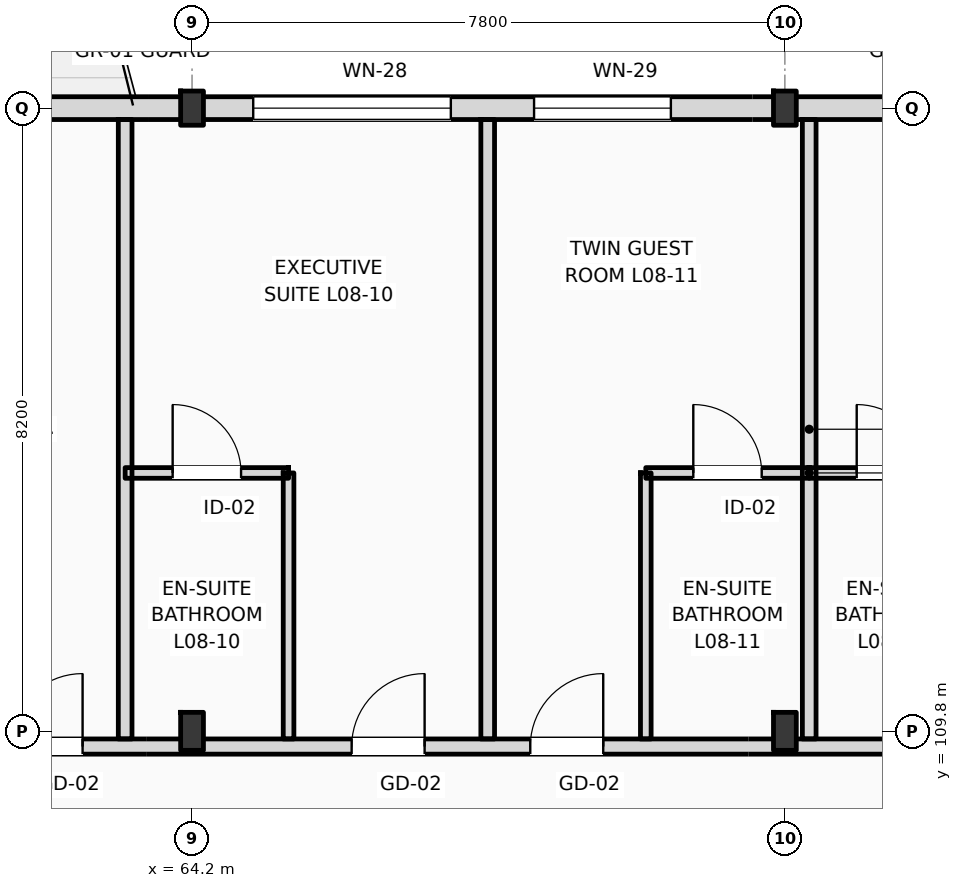
"""IFC4 building model, lengths in metres.
Left out: names, types, materials, properties, quantities, classifications, styles, units other than length and angle.
Written with IfcOpenShell. Run it as: python <this file> out.ifc"""

import sys

from ifc_helpers import new_model, si_unit, direction, frame, frame_2d, origin, origin_2d, place, context, subcontext, project, spatial, rectangle, i_section, extrude, element, fill, save


model = new_model("IFC4")
c1 = context("Model", 3, precision=1e-05, world=origin(), true_north=direction((0.0, 1.0)))
c2 = subcontext(c1, "Body", "Model", "MODEL_VIEW")
j1 = project(units=[si_unit("LENGTHUNIT", "METRE"), si_unit("PLANEANGLEUNIT", "RADIAN")], contexts=[c1])
p1 = place(None, origin())
s1 = spatial("IfcSite", under=j1, at=p1, CompositionType="ELEMENT")
p2 = place(p1, origin())
s2 = spatial("IfcBuilding", under=s1, at=p2, CompositionType="ELEMENT")
p3 = place(p2, frame((0.0, 0.0, 35.4)))
s3 = spatial("IfcBuildingStorey", under=s2, at=p3, CompositionType="ELEMENT", Elevation=35.4)
p4 = place(p3, frame((64.2, 109.8, 0.0), z_axis=(0.0, 0.0, 1.0), x_axis=(1.0, 0.0, 0.0)))
e1 = element("IfcColumn", 1, at=p4, inside=s3, PredefinedType="COLUMN", context=c2, shape_type="SweptSolid", body=[
    extrude(i_section(OverallWidth=0.3, OverallDepth=0.5, WebThickness=0.014, FlangeThickness=0.028, FilletRadius=0.027, at=origin_2d()), origin(), (0.0, 0.0, 1.0), 3.6),
])
p5 = place(p3, frame((64.2, 118.0, 0.0), z_axis=(0.0, 0.0, 1.0), x_axis=(1.0, 0.0, 0.0)))
e2 = element("IfcColumn", 2, at=p5, inside=s3, PredefinedType="COLUMN", context=c2, shape_type="SweptSolid", body=[
    extrude(i_section(OverallWidth=0.3, OverallDepth=0.45, WebThickness=0.014, FlangeThickness=0.026, FilletRadius=0.027, at=origin_2d()), origin(), (0.0, 0.0, 1.0), 3.6),
])
p6 = place(p3, frame((72.0, 109.8, 0.0), z_axis=(0.0, 0.0, 1.0), x_axis=(1.0, 0.0, 0.0)))
e3 = element("IfcColumn", 3, at=p6, inside=s3, PredefinedType="COLUMN", context=c2, shape_type="SweptSolid", body=[
    extrude(i_section(OverallWidth=0.3, OverallDepth=0.5, WebThickness=0.014, FlangeThickness=0.028, FilletRadius=0.027, at=origin_2d()), origin(), (0.0, 0.0, 1.0), 3.6),
])
p7 = place(p3, frame((72.0, 118.0, 0.0), z_axis=(0.0, 0.0, 1.0), x_axis=(1.0, 0.0, 0.0)))
e4 = element("IfcColumn", 4, at=p7, inside=s3, PredefinedType="COLUMN", context=c2, shape_type="SweptSolid", body=[
    extrude(i_section(OverallWidth=0.3, OverallDepth=0.45, WebThickness=0.014, FlangeThickness=0.026, FilletRadius=0.027, at=origin_2d()), origin(), (0.0, 0.0, 1.0), 3.6),
])
p8 = place(p3, frame((22.5, 118.0, 0.0), z_axis=(0.0, 0.0, 1.0), x_axis=(1.0, 0.0, 0.0)))
e5 = element("IfcWall", 5, at=p8, inside=s3, PredefinedType="STANDARD", context=c2, shape_type="SweptSolid", body=[
    extrude(rectangle(XDim=72.9, YDim=0.3, at=frame_2d((36.45, 0.0))), origin(), (0.0, 0.0, 1.0), 2.92),
])
p9 = place(p8, frame((0.91, 0.0, 0.9)))
e6 = element("IfcOpeningElement", 6, at=p9, cuts=e5, PredefinedType="OPENING", context=c2, shape_type="SweptSolid", body=[
    extrude(rectangle(XDim=0.9, YDim=1.84, at=frame_2d((0.45, 0.92))), frame((0.0, 0.16, 0.0), z_axis=(0.0, -1.0, 0.0), x_axis=(1.0, 0.0, 0.0)), (0.0, 0.0, 1.0), 0.32),
])
p10 = place(p8, frame((6.665, 0.0, 0.0)))
e7 = element("IfcOpeningElement", 7, at=p10, cuts=e5, PredefinedType="OPENING", context=c2, shape_type="SweptSolid", body=[
    extrude(rectangle(XDim=1.2, YDim=2.25, at=frame_2d((0.6, 1.125))), frame((0.0, 0.16, 0.0), z_axis=(0.0, -1.0, 0.0), x_axis=(1.0, 0.0, 0.0)), (0.0, 0.0, 1.0), 0.32),
])
p11 = place(p8, frame((11.355, 0.0, 0.9)))
e8 = element("IfcOpeningElement", 8, at=p11, cuts=e5, PredefinedType="OPENING", context=c2, shape_type="SweptSolid", body=[
    extrude(rectangle(XDim=1.1, YDim=1.5, at=frame_2d((0.55, 0.75))), frame((0.0, 0.16, 0.0), z_axis=(0.0, -1.0, 0.0), x_axis=(1.0, 0.0, 0.0)), (0.0, 0.0, 1.0), 0.32),
])
p12 = place(p8, frame((15.58, 0.0, 0.9)))
e9 = element("IfcOpeningElement", 9, at=p12, cuts=e5, PredefinedType="OPENING", context=c2, shape_type="SweptSolid", body=[
    extrude(rectangle(XDim=1.25, YDim=1.6, at=frame_2d((0.625, 0.8))), frame((0.0, 0.16, 0.0), z_axis=(0.0, -1.0, 0.0), x_axis=(1.0, 0.0, 0.0)), (0.0, 0.0, 1.0), 0.32),
])
p13 = place(p8, frame((21.08, 0.0, 0.0)))
e10 = element("IfcOpeningElement", 10, at=p13, cuts=e5, PredefinedType="OPENING", context=c2, shape_type="SweptSolid", body=[
    extrude(rectangle(XDim=1.2, YDim=2.25, at=frame_2d((0.6, 1.125))), frame((0.0, 0.16, 0.0), z_axis=(0.0, -1.0, 0.0), x_axis=(1.0, 0.0, 0.0)), (0.0, 0.0, 1.0), 0.32),
])
p14 = place(p8, frame((23.54, 0.0, 0.0)))
e11 = element("IfcOpeningElement", 11, at=p14, cuts=e5, PredefinedType="OPENING", context=c2, shape_type="SweptSolid", body=[
    extrude(rectangle(XDim=1.2, YDim=2.25, at=frame_2d((0.6, 1.125))), frame((0.0, 0.16, 0.0), z_axis=(0.0, -1.0, 0.0), x_axis=(1.0, 0.0, 0.0)), (0.0, 0.0, 1.0), 0.32),
])
p15 = place(p8, frame((28.83, 0.0, 0.9)))
e12 = element("IfcOpeningElement", 12, at=p15, cuts=e5, PredefinedType="OPENING", context=c2, shape_type="SweptSolid", body=[
    extrude(rectangle(XDim=1.75, YDim=1.84, at=frame_2d((0.875, 0.92))), frame((0.0, 0.16, 0.0), z_axis=(0.0, -1.0, 0.0), x_axis=(1.0, 0.0, 0.0)), (0.0, 0.0, 1.0), 0.32),
])
p16 = place(p8, frame((34.805, 0.0, 0.9)))
e13 = element("IfcOpeningElement", 13, at=p16, cuts=e5, PredefinedType="OPENING", context=c2, shape_type="SweptSolid", body=[
    extrude(rectangle(XDim=1.35, YDim=1.84, at=frame_2d((0.675, 0.92))), frame((0.0, 0.16, 0.0), z_axis=(0.0, -1.0, 0.0), x_axis=(1.0, 0.0, 0.0)), (0.0, 0.0, 1.0), 0.32),
])
p17 = place(p8, frame((38.105, 0.0, 0.0)))
e14 = element("IfcOpeningElement", 14, at=p17, cuts=e5, PredefinedType="OPENING", context=c2, shape_type="SweptSolid", body=[
    extrude(rectangle(XDim=1.2, YDim=2.25, at=frame_2d((0.6, 1.125))), frame((0.0, 0.16, 0.0), z_axis=(0.0, -1.0, 0.0), x_axis=(1.0, 0.0, 0.0)), (0.0, 0.0, 1.0), 0.32),
])
p18 = place(p8, frame((42.505, 0.0, 0.9)))
e15 = element("IfcOpeningElement", 15, at=p18, cuts=e5, PredefinedType="OPENING", context=c2, shape_type="SweptSolid", body=[
    extrude(rectangle(XDim=2.6, YDim=1.84, at=frame_2d((1.3, 0.92))), frame((0.0, 0.16, 0.0), z_axis=(0.0, -1.0, 0.0), x_axis=(1.0, 0.0, 0.0)), (0.0, 0.0, 1.0), 0.32),
])
p19 = place(p8, frame((46.2, 0.0, 0.9)))
e16 = element("IfcOpeningElement", 16, at=p19, cuts=e5, PredefinedType="OPENING", context=c2, shape_type="SweptSolid", body=[
    extrude(rectangle(XDim=1.8, YDim=1.84, at=frame_2d((0.9, 0.92))), frame((0.0, 0.16, 0.0), z_axis=(0.0, -1.0, 0.0), x_axis=(1.0, 0.0, 0.0)), (0.0, 0.0, 1.0), 0.32),
])
p20 = place(p8, frame((52.565, 0.0, 0.0)))
e17 = element("IfcOpeningElement", 17, at=p20, cuts=e5, PredefinedType="OPENING", context=c2, shape_type="SweptSolid", body=[
    extrude(rectangle(XDim=1.2, YDim=2.25, at=frame_2d((0.6, 1.125))), frame((0.0, 0.16, 0.0), z_axis=(0.0, -1.0, 0.0), x_axis=(1.0, 0.0, 0.0)), (0.0, 0.0, 1.0), 0.32),
])
p21 = place(p8, frame((55.305, 0.0, 0.9)))
e18 = element("IfcOpeningElement", 18, at=p21, cuts=e5, PredefinedType="OPENING", context=c2, shape_type="SweptSolid", body=[
    extrude(rectangle(XDim=1.2, YDim=1.8, at=frame_2d((0.6, 0.9))), frame((0.0, 0.16, 0.0), z_axis=(0.0, -1.0, 0.0), x_axis=(1.0, 0.0, 0.0)), (0.0, 0.0, 1.0), 0.32),
])
p22 = place(p8, frame((60.53, 0.0, 0.9)))
e19 = element("IfcOpeningElement", 19, at=p22, cuts=e5, PredefinedType="OPENING", context=c2, shape_type="SweptSolid", body=[
    extrude(rectangle(XDim=1.35, YDim=1.84, at=frame_2d((0.675, 0.92))), frame((0.0, 0.16, 0.0), z_axis=(0.0, -1.0, 0.0), x_axis=(1.0, 0.0, 0.0)), (0.0, 0.0, 1.0), 0.32),
])
p23 = place(p8, frame((65.955, 0.0, 0.9)))
e20 = element("IfcOpeningElement", 20, at=p23, cuts=e5, PredefinedType="OPENING", context=c2, shape_type="SweptSolid", body=[
    extrude(rectangle(XDim=1.35, YDim=1.84, at=frame_2d((0.675, 0.92))), frame((0.0, 0.16, 0.0), z_axis=(0.0, -1.0, 0.0), x_axis=(1.0, 0.0, 0.0)), (0.0, 0.0, 1.0), 0.32),
])
p24 = place(p8, frame((69.335, 0.0, 0.9)))
e21 = element("IfcOpeningElement", 21, at=p24, cuts=e5, PredefinedType="OPENING", context=c2, shape_type="SweptSolid", body=[
    extrude(rectangle(XDim=1.65, YDim=1.84, at=frame_2d((0.825, 0.92))), frame((0.0, 0.16, 0.0), z_axis=(0.0, -1.0, 0.0), x_axis=(1.0, 0.0, 0.0)), (0.0, 0.0, 1.0), 0.32),
])
p25 = place(p3, frame((10.65, 109.6, 0.0), z_axis=(0.0, 0.0, 1.0), x_axis=(1.0, 0.0, 0.0)))
e22 = element("IfcWall", 22, at=p25, inside=s3, PredefinedType="PARTITIONING", context=c2, shape_type="SweptSolid", body=[
    extrude(rectangle(XDim=84.61, YDim=0.2, at=frame_2d((42.305, 0.0))), origin(), (0.0, 0.0, 1.0), 2.82),
])
p26 = place(p25, frame((12.675, 0.0, 0.0)))
e23 = element("IfcOpeningElement", 23, at=p26, cuts=e22, PredefinedType="OPENING", context=c2, shape_type="SweptSolid", body=[
    extrude(rectangle(XDim=1.02, YDim=2.2, at=frame_2d((0.51, 1.1))), frame((0.0, 0.11, 0.0), z_axis=(0.0, -1.0, 0.0), x_axis=(1.0, 0.0, 0.0)), (0.0, 0.0, 1.0), 0.22),
])
p27 = place(p25, frame((19.62, 0.0, 0.0)))
e24 = element("IfcOpeningElement", 24, at=p27, cuts=e22, PredefinedType="OPENING", context=c2, shape_type="SweptSolid", body=[
    extrude(rectangle(XDim=1.02, YDim=2.2, at=frame_2d((0.51, 1.1))), frame((0.0, 0.11, 0.0), z_axis=(0.0, -1.0, 0.0), x_axis=(1.0, 0.0, 0.0)), (0.0, 0.0, 1.0), 0.22),
])
p28 = place(p25, frame((24.12, 0.0, 0.0)))
e25 = element("IfcOpeningElement", 25, at=p28, cuts=e22, PredefinedType="OPENING", context=c2, shape_type="SweptSolid", body=[
    extrude(rectangle(XDim=1.02, YDim=2.2, at=frame_2d((0.51, 1.1))), frame((0.0, 0.11, 0.0), z_axis=(0.0, -1.0, 0.0), x_axis=(1.0, 0.0, 0.0)), (0.0, 0.0, 1.0), 0.22),
])
p29 = place(p25, frame((26.47, 0.0, 0.0)))
e26 = element("IfcOpeningElement", 26, at=p29, cuts=e22, PredefinedType="OPENING", context=c2, shape_type="SweptSolid", body=[
    extrude(rectangle(XDim=1.02, YDim=2.2, at=frame_2d((0.51, 1.1))), frame((0.0, 0.11, 0.0), z_axis=(0.0, -1.0, 0.0), x_axis=(1.0, 0.0, 0.0)), (0.0, 0.0, 1.0), 0.22),
])
p30 = place(p25, frame((33.15, 0.0, 0.0)))
e27 = element("IfcOpeningElement", 27, at=p30, cuts=e22, PredefinedType="OPENING", context=c2, shape_type="SweptSolid", body=[
    extrude(rectangle(XDim=0.96, YDim=2.2, at=frame_2d((0.48, 1.1))), frame((0.0, 0.11, 0.0), z_axis=(0.0, -1.0, 0.0), x_axis=(1.0, 0.0, 0.0)), (0.0, 0.0, 1.0), 0.22),
])
p31 = place(p25, frame((35.5, 0.0, 0.0)))
e28 = element("IfcOpeningElement", 28, at=p31, cuts=e22, PredefinedType="OPENING", context=c2, shape_type="SweptSolid", body=[
    extrude(rectangle(XDim=0.96, YDim=2.2, at=frame_2d((0.48, 1.1))), frame((0.0, 0.11, 0.0), z_axis=(0.0, -1.0, 0.0), x_axis=(1.0, 0.0, 0.0)), (0.0, 0.0, 1.0), 0.22),
])
p32 = place(p25, frame((42.15, 0.0, 0.0)))
e29 = element("IfcOpeningElement", 29, at=p32, cuts=e22, PredefinedType="OPENING", context=c2, shape_type="SweptSolid", body=[
    extrude(rectangle(XDim=0.96, YDim=2.2, at=frame_2d((0.48, 1.1))), frame((0.0, 0.11, 0.0), z_axis=(0.0, -1.0, 0.0), x_axis=(1.0, 0.0, 0.0)), (0.0, 0.0, 1.0), 0.22),
])
p33 = place(p25, frame((47.15, 0.0, 0.0)))
e30 = element("IfcOpeningElement", 30, at=p33, cuts=e22, PredefinedType="OPENING", context=c2, shape_type="SweptSolid", body=[
    extrude(rectangle(XDim=0.96, YDim=2.2, at=frame_2d((0.48, 1.1))), frame((0.0, 0.11, 0.0), z_axis=(0.0, -1.0, 0.0), x_axis=(1.0, 0.0, 0.0)), (0.0, 0.0, 1.0), 0.22),
])
p34 = place(p25, frame((51.15, 0.0, 0.0)))
e31 = element("IfcOpeningElement", 31, at=p34, cuts=e22, PredefinedType="OPENING", context=c2, shape_type="SweptSolid", body=[
    extrude(rectangle(XDim=0.96, YDim=2.2, at=frame_2d((0.48, 1.1))), frame((0.0, 0.11, 0.0), z_axis=(0.0, -1.0, 0.0), x_axis=(1.0, 0.0, 0.0)), (0.0, 0.0, 1.0), 0.22),
])
p35 = place(p25, frame((55.65, 0.0, 0.0)))
e32 = element("IfcOpeningElement", 32, at=p35, cuts=e22, PredefinedType="OPENING", context=c2, shape_type="SweptSolid", body=[
    extrude(rectangle(XDim=0.96, YDim=2.2, at=frame_2d((0.48, 1.1))), frame((0.0, 0.11, 0.0), z_axis=(0.0, -1.0, 0.0), x_axis=(1.0, 0.0, 0.0)), (0.0, 0.0, 1.0), 0.22),
])
p36 = place(p25, frame((58.0, 0.0, 0.0)))
e33 = element("IfcOpeningElement", 33, at=p36, cuts=e22, PredefinedType="OPENING", context=c2, shape_type="SweptSolid", body=[
    extrude(rectangle(XDim=0.96, YDim=2.2, at=frame_2d((0.48, 1.1))), frame((0.0, 0.11, 0.0), z_axis=(0.0, -1.0, 0.0), x_axis=(1.0, 0.0, 0.0)), (0.0, 0.0, 1.0), 0.22),
])
p37 = place(p25, frame((64.65, 0.0, 0.0)))
e34 = element("IfcOpeningElement", 34, at=p37, cuts=e22, PredefinedType="OPENING", context=c2, shape_type="SweptSolid", body=[
    extrude(rectangle(XDim=0.96, YDim=2.2, at=frame_2d((0.48, 1.1))), frame((0.0, 0.11, 0.0), z_axis=(0.0, -1.0, 0.0), x_axis=(1.0, 0.0, 0.0)), (0.0, 0.0, 1.0), 0.22),
])
p38 = place(p25, frame((66.75, 0.0, 0.0)))
e35 = element("IfcOpeningElement", 35, at=p38, cuts=e22, PredefinedType="OPENING", context=c2, shape_type="SweptSolid", body=[
    extrude(rectangle(XDim=0.96, YDim=2.2, at=frame_2d((0.48, 1.1))), frame((0.0, 0.11, 0.0), z_axis=(0.0, -1.0, 0.0), x_axis=(1.0, 0.0, 0.0)), (0.0, 0.0, 1.0), 0.22),
])
p39 = place(p25, frame((73.65, 0.0, 0.0)))
e36 = element("IfcOpeningElement", 36, at=p39, cuts=e22, PredefinedType="OPENING", context=c2, shape_type="SweptSolid", body=[
    extrude(rectangle(XDim=0.96, YDim=2.2, at=frame_2d((0.48, 1.1))), frame((0.0, 0.11, 0.0), z_axis=(0.0, -1.0, 0.0), x_axis=(1.0, 0.0, 0.0)), (0.0, 0.0, 1.0), 0.22),
])
p40 = place(p25, frame((78.4, 0.0, 0.0)))
e37 = element("IfcOpeningElement", 37, at=p40, cuts=e22, PredefinedType="OPENING", context=c2, shape_type="SweptSolid", body=[
    extrude(rectangle(XDim=0.96, YDim=2.2, at=frame_2d((0.48, 1.1))), frame((0.0, 0.11, 0.0), z_axis=(0.0, -1.0, 0.0), x_axis=(1.0, 0.0, 0.0)), (0.0, 0.0, 1.0), 0.22),
])
p41 = place(p25, frame((80.455, 0.0, 0.0)))
e38 = element("IfcOpeningElement", 38, at=p41, cuts=e22, PredefinedType="OPENING", context=c2, shape_type="SweptSolid", body=[
    extrude(rectangle(XDim=0.96, YDim=2.2, at=frame_2d((0.48, 1.1))), frame((0.0, 0.11, 0.0), z_axis=(0.0, -1.0, 0.0), x_axis=(1.0, 0.0, 0.0)), (0.0, 0.0, 1.0), 0.22),
])
p42 = place(p25, frame((2.716, 0.0, 0.0)))
e39 = element("IfcOpeningElement", 39, at=p42, cuts=e22, PredefinedType="OPENING", context=c2, shape_type="SweptSolid", body=[
    extrude(rectangle(XDim=1.35, YDim=2.25, at=frame_2d((0.675, 1.125))), frame((0.0, 0.11, 0.0), z_axis=(0.0, -1.0, 0.0), x_axis=(1.0, 0.0, 0.0)), (0.0, 0.0, 1.0), 0.22),
])
p43 = place(p25, frame((6.65, 0.0, 0.0)))
e40 = element("IfcOpeningElement", 40, at=p43, cuts=e22, PredefinedType="OPENING", context=c2, shape_type="SweptSolid", body=[
    extrude(rectangle(XDim=1.35, YDim=2.25, at=frame_2d((0.675, 1.125))), frame((0.0, 0.11, 0.0), z_axis=(0.0, -1.0, 0.0), x_axis=(1.0, 0.0, 0.0)), (0.0, 0.0, 1.0), 0.22),
])
p44 = place(p25, frame((10.583, 0.0, 0.0)))
e41 = element("IfcOpeningElement", 41, at=p44, cuts=e22, PredefinedType="OPENING", context=c2, shape_type="SweptSolid", body=[
    extrude(rectangle(XDim=1.35, YDim=2.25, at=frame_2d((0.675, 1.125))), frame((0.0, 0.11, 0.0), z_axis=(0.0, -1.0, 0.0), x_axis=(1.0, 0.0, 0.0)), (0.0, 0.0, 1.0), 0.22),
])
for number, where, z_axis, x_axis in (
    (42, (63.32, 109.7, 0.0), (0.0, 0.0, 1.0), (0.0, 1.0, 0.0)),
    (43, (68.09, 109.7, 0.0), (0.0, 0.0, 1.0), (0.0, 1.0, 0.0)),
):
    element("IfcWall", number, at=place(p3, frame(where, z_axis=z_axis, x_axis=x_axis)), inside=s3, PredefinedType="PARTITIONING", context=c2, shape_type="SweptSolid", body=[
        extrude(rectangle(XDim=8.15, YDim=0.18, at=frame_2d((4.075, 0.0))), origin(), (0.0, 0.0, 1.0), 3.38),
    ])
p45 = place(p3, frame((65.47, 109.7, 0.0), z_axis=(0.0, 0.0, 1.0), x_axis=(0.0, 1.0, 0.0)))
e44 = element("IfcWall", 44, at=p45, inside=s3, PredefinedType="PARTITIONING", context=c2, shape_type="SweptSolid", body=[
    extrude(rectangle(XDim=3.5, YDim=0.14, at=frame_2d((1.75, 0.0))), origin(), (0.0, 0.0, 1.0), 3.38),
])
p46 = place(p3, frame((63.32, 113.2, 0.0), z_axis=(0.0, 0.0, 1.0), x_axis=(1.0, 0.0, 0.0)))
e45 = element("IfcWall", 45, at=p46, inside=s3, PredefinedType="PARTITIONING", context=c2, shape_type="SweptSolid", body=[
    extrude(rectangle(XDim=2.15, YDim=0.14, at=frame_2d((1.075, 0.0))), origin(), (0.0, 0.0, 1.0), 3.38),
])
p47 = place(p46, frame((0.625, 0.0, 0.0)))
e46 = element("IfcOpeningElement", 46, at=p47, cuts=e45, PredefinedType="OPENING", context=c2, shape_type="SweptSolid", body=[
    extrude(rectangle(XDim=0.9, YDim=2.1, at=frame_2d((0.45, 1.05))), frame((0.0, 0.08, 0.0), z_axis=(0.0, -1.0, 0.0), x_axis=(1.0, 0.0, 0.0)), (0.0, 0.0, 1.0), 0.16),
])
p48 = place(p3, frame((72.32, 109.7, 0.0), z_axis=(0.0, 0.0, 1.0), x_axis=(0.0, 1.0, 0.0)))
e47 = element("IfcWall", 47, at=p48, inside=s3, PredefinedType="PARTITIONING", context=c2, shape_type="SweptSolid", body=[
    extrude(rectangle(XDim=8.15, YDim=0.18, at=frame_2d((4.075, 0.0))), origin(), (0.0, 0.0, 1.0), 3.38),
])
p49 = place(p3, frame((70.17, 109.7, 0.0), z_axis=(0.0, 0.0, 1.0), x_axis=(0.0, 1.0, 0.0)))
e48 = element("IfcWall", 48, at=p49, inside=s3, PredefinedType="PARTITIONING", context=c2, shape_type="SweptSolid", body=[
    extrude(rectangle(XDim=3.5, YDim=0.14, at=frame_2d((1.75, 0.0))), origin(), (0.0, 0.0, 1.0), 3.38),
])
p50 = place(p3, frame((70.17, 113.2, 0.0), z_axis=(0.0, 0.0, 1.0), x_axis=(1.0, 0.0, 0.0)))
e49 = element("IfcWall", 49, at=p50, inside=s3, PredefinedType="PARTITIONING", context=c2, shape_type="SweptSolid", body=[
    extrude(rectangle(XDim=2.15, YDim=0.14, at=frame_2d((1.075, 0.0))), origin(), (0.0, 0.0, 1.0), 3.38),
])
p51 = place(p50, frame((0.625, 0.0, 0.0)))
e50 = element("IfcOpeningElement", 50, at=p51, cuts=e49, PredefinedType="OPENING", context=c2, shape_type="SweptSolid", body=[
    extrude(rectangle(XDim=0.9, YDim=2.1, at=frame_2d((0.45, 1.05))), frame((0.0, 0.08, 0.0), z_axis=(0.0, -1.0, 0.0), x_axis=(1.0, 0.0, 0.0)), (0.0, 0.0, 1.0), 0.16),
])
p52 = place(p3, frame((72.32, 113.2, 0.0), z_axis=(0.0, 0.0, 1.0), x_axis=(1.0, 0.0, 0.0)))
e51 = element("IfcWall", 51, at=p52, inside=s3, PredefinedType="PARTITIONING", context=c2, shape_type="SweptSolid", body=[
    extrude(rectangle(XDim=2.15, YDim=0.14, at=frame_2d((1.075, 0.0))), origin(), (0.0, 0.0, 1.0), 3.38),
])
p53 = place(p52, frame((0.625, 0.0, 0.0)))
e52 = element("IfcOpeningElement", 52, at=p53, cuts=e51, PredefinedType="OPENING", context=c2, shape_type="SweptSolid", body=[
    extrude(rectangle(XDim=0.9, YDim=2.1, at=frame_2d((0.45, 1.05))), frame((0.0, 0.08, 0.0), z_axis=(0.0, -1.0, 0.0), x_axis=(1.0, 0.0, 0.0)), (0.0, 0.0, 1.0), 0.16),
])
p54 = place(p18, origin())
e53 = element("IfcWindow", 53, at=p54, inside=s3, PartitioningType="DOUBLE_PANEL_VERTICAL", PredefinedType="WINDOW", context=c2, shape_type="SweptSolid", body=[
    extrude(rectangle(XDim=2.6, YDim=1.84, at=frame_2d((1.3, 0.92))), frame((0.0, 0.03, 0.0), z_axis=(0.0, -1.0, 0.0), x_axis=(1.0, 0.0, 0.0)), (0.0, 0.0, 1.0), 0.06),
])
fill(e15, e53)
p55 = place(p19, origin())
e54 = element("IfcWindow", 54, at=p55, inside=s3, PartitioningType="DOUBLE_PANEL_VERTICAL", PredefinedType="WINDOW", context=c2, shape_type="SweptSolid", body=[
    extrude(rectangle(XDim=1.8, YDim=1.84, at=frame_2d((0.9, 0.92))), frame((0.0, 0.03, 0.0), z_axis=(0.0, -1.0, 0.0), x_axis=(1.0, 0.0, 0.0)), (0.0, 0.0, 1.0), 0.06),
])
fill(e16, e54)
p56 = place(p34, origin())
e55 = element("IfcDoor", 55, at=p56, inside=s3, OperationType="SINGLE_SWING_RIGHT", PredefinedType="DOOR", context=c2, shape_type="SweptSolid", body=[
    extrude(rectangle(XDim=0.96, YDim=2.2, at=frame_2d((0.48, 1.1))), frame((0.0, 0.025, 0.0), z_axis=(0.0, -1.0, 0.0), x_axis=(1.0, 0.0, 0.0)), (0.0, 0.0, 1.0), 0.05),
])
fill(e31, e55)
p57 = place(p35, origin())
e56 = element("IfcDoor", 56, at=p57, inside=s3, OperationType="SINGLE_SWING_RIGHT", PredefinedType="DOOR", context=c2, shape_type="SweptSolid", body=[
    extrude(rectangle(XDim=0.96, YDim=2.2, at=frame_2d((0.48, 1.1))), frame((0.0, 0.025, 0.0), z_axis=(0.0, -1.0, 0.0), x_axis=(1.0, 0.0, 0.0)), (0.0, 0.0, 1.0), 0.05),
])
fill(e32, e56)
p58 = place(p47, origin())
e57 = element("IfcDoor", 57, at=p58, inside=s3, OperationType="SINGLE_SWING_LEFT", PredefinedType="DOOR", context=c2, shape_type="SweptSolid", body=[
    extrude(rectangle(XDim=0.9, YDim=2.1, at=frame_2d((0.45, 1.05))), frame((0.0, 0.025, 0.0), z_axis=(0.0, -1.0, 0.0), x_axis=(1.0, 0.0, 0.0)), (0.0, 0.0, 1.0), 0.05),
])
fill(e46, e57)
p59 = place(p36, origin())
e58 = element("IfcDoor", 58, at=p59, inside=s3, OperationType="SINGLE_SWING_RIGHT", PredefinedType="DOOR", context=c2, shape_type="SweptSolid", body=[
    extrude(rectangle(XDim=0.96, YDim=2.2, at=frame_2d((0.48, 1.1))), frame((0.0, 0.025, 0.0), z_axis=(0.0, -1.0, 0.0), x_axis=(1.0, 0.0, 0.0)), (0.0, 0.0, 1.0), 0.05),
])
fill(e33, e58)
p60 = place(p51, origin())
e59 = element("IfcDoor", 59, at=p60, inside=s3, OperationType="SINGLE_SWING_LEFT", PredefinedType="DOOR", context=c2, shape_type="SweptSolid", body=[
    extrude(rectangle(XDim=0.9, YDim=2.1, at=frame_2d((0.45, 1.05))), frame((0.0, 0.025, 0.0), z_axis=(0.0, -1.0, 0.0), x_axis=(1.0, 0.0, 0.0)), (0.0, 0.0, 1.0), 0.05),
])
fill(e50, e59)
p61 = place(p53, origin())
e60 = element("IfcDoor", 60, at=p61, inside=s3, OperationType="SINGLE_SWING_LEFT", PredefinedType="DOOR", context=c2, shape_type="SweptSolid", body=[
    extrude(rectangle(XDim=0.9, YDim=2.1, at=frame_2d((0.45, 1.05))), frame((0.0, 0.025, 0.0), z_axis=(0.0, -1.0, 0.0), x_axis=(1.0, 0.0, 0.0)), (0.0, 0.0, 1.0), 0.05),
])
fill(e52, e60)
save(model, sys.argv[1])
